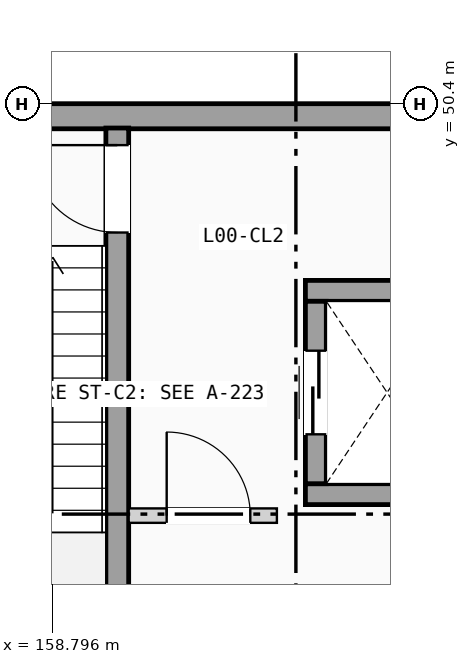
"""IFC4 building model, lengths in metres.
Left out: names, types, materials, properties, quantities, classifications, styles, units other than length and angle.
Written with IfcOpenShell. Run it as: python <this file> out.ifc"""

import sys

from ifc_helpers import new_model, si_unit, direction, frame, frame_2d, origin, place, context, subcontext, project, spatial, rectangle, extrude, element, fill, save


model = new_model("IFC4")
c1 = context("Model", 3, precision=1e-05, world=origin(), true_north=direction((0.0, 1.0)))
c2 = subcontext(c1, "Body", "Model", "MODEL_VIEW")
j1 = project(units=[si_unit("LENGTHUNIT", "METRE"), si_unit("PLANEANGLEUNIT", "RADIAN")], contexts=[c1])
p1 = place(None, origin())
s1 = spatial("IfcSite", under=j1, at=p1, CompositionType="ELEMENT")
p2 = place(p1, origin())
s2 = spatial("IfcBuilding", under=s1, at=p2, CompositionType="ELEMENT")
p3 = place(p2, origin())
s3 = spatial("IfcBuildingStorey", under=s2, at=p3, CompositionType="ELEMENT", Elevation=0.0)
p4 = place(p3, frame((147.6, 50.235, 0.0), z_axis=(0.0, 0.0, 1.0), x_axis=(1.0, 0.0, 0.0)))
e1 = element("IfcWall", 1, at=p4, inside=s3, PredefinedType="SOLIDWALL", context=c2, shape_type="SweptSolid", body=[
    extrude(rectangle(XDim=25.2, YDim=0.33, at=frame_2d((12.6, 0.0))), origin(), (0.0, 0.0, 1.0), 4.64),
])
p5 = place(p4, frame((9.75, 0.0, 0.0)))
e2 = element("IfcOpeningElement", 2, at=p5, cuts=e1, PredefinedType="OPENING", context=c2, shape_type="SweptSolid", body=[
    extrude(rectangle(XDim=1.3, YDim=2.2, at=frame_2d((0.65, 1.1))), frame((0.0, 0.175, 0.0), z_axis=(0.0, -1.0, 0.0), x_axis=(1.0, 0.0, 0.0)), (0.0, 0.0, 1.0), 0.35),
])
p6 = place(p3, frame((159.65, 43.08, 0.0), z_axis=(0.0, 0.0, 1.0), x_axis=(0.0, 1.0, 0.0)))
e3 = element("IfcWall", 3, at=p6, inside=s3, PredefinedType="SHEAR", context=c2, shape_type="SweptSolid", body=[
    extrude(rectangle(XDim=7.0, YDim=0.3, at=frame_2d((3.5, 0.0))), origin(), (0.0, 0.0, 1.0), 4.64),
])
p7 = place(p6, frame((5.625, 0.0, 0.0)))
e4 = element("IfcOpeningElement", 4, at=p7, cuts=e3, PredefinedType="OPENING", context=c2, shape_type="SweptSolid", body=[
    extrude(rectangle(XDim=1.15, YDim=2.12, at=frame_2d((0.575, 1.06))), frame((0.0, 0.16, 0.0), z_axis=(0.0, -1.0, 0.0), x_axis=(1.0, 0.0, 0.0)), (0.0, 0.0, 1.0), 0.32),
])
for number, where, z_axis, x_axis in (
    (5, (162.125, 45.262, 0.0), (0.0, 0.0, 1.0), (1.0, 0.0, 0.0)),
    (6, (162.125, 47.938, 0.0), (0.0, 0.0, 1.0), (1.0, 0.0, 0.0)),
):
    element("IfcWall", number, at=place(p3, frame(where, z_axis=z_axis, x_axis=x_axis)), inside=s3, PredefinedType="SHEAR", context=c2, shape_type="SweptSolid", body=[
        extrude(rectangle(XDim=2.15, YDim=0.275, at=frame_2d((1.075, 0.0))), origin(), (0.0, 0.0, 1.0), 4.64),
    ])
p8 = place(p3, frame((162.262, 45.4, 0.0), z_axis=(0.0, 0.0, 1.0), x_axis=(0.0, 1.0, 0.0)))
e7 = element("IfcWall", 7, at=p8, inside=s3, PredefinedType="SHEAR", context=c2, shape_type="SweptSolid", body=[
    extrude(rectangle(XDim=2.4, YDim=0.275, at=frame_2d((1.2, 0.0))), origin(), (0.0, 0.0, 1.0), 4.64),
])
p9 = place(p8, frame((0.65, 0.0, 0.0)))
e8 = element("IfcOpeningElement", 8, at=p9, cuts=e7, PredefinedType="OPENING", context=c2, shape_type="SweptSolid", body=[
    extrude(rectangle(XDim=1.1, YDim=2.15, at=frame_2d((0.55, 1.075))), frame((0.0, 0.147, 0.0), z_axis=(0.0, -1.0, 0.0), x_axis=(1.0, 0.0, 0.0)), (0.0, 0.0, 1.0), 0.295),
])
p10 = place(p3, frame((159.8, 44.98, 0.0), z_axis=(0.0, 0.0, 1.0), x_axis=(1.0, 0.0, 0.0)))
e9 = element("IfcWall", 9, at=p10, inside=s3, PredefinedType="PARTITIONING", context=c2, shape_type="SweptSolid", body=[
    extrude(rectangle(XDim=1.95, YDim=0.19, at=frame_2d((0.975, 0.0))), origin(), (0.0, 0.0, 1.0), 3.84),
])
p11 = place(p10, frame((0.5, 0.0, 0.0)))
e10 = element("IfcOpeningElement", 10, at=p11, cuts=e9, PredefinedType="OPENING", context=c2, shape_type="SweptSolid", body=[
    extrude(rectangle(XDim=1.1, YDim=2.12, at=frame_2d((0.55, 1.06))), frame((0.0, 0.105, 0.0), z_axis=(0.0, -1.0, 0.0), x_axis=(1.0, 0.0, 0.0)), (0.0, 0.0, 1.0), 0.21),
])
p12 = place(p7, origin())
e11 = element("IfcDoor", 11, at=p12, inside=s3, OperationType="SINGLE_SWING_RIGHT", PredefinedType="DOOR", context=c2, shape_type="SweptSolid", body=[
    extrude(rectangle(XDim=1.15, YDim=2.12, at=frame_2d((0.575, 1.06))), frame((0.0, 0.025, 0.0), z_axis=(0.0, -1.0, 0.0), x_axis=(1.0, 0.0, 0.0)), (0.0, 0.0, 1.0), 0.05),
])
fill(e4, e11)
p13 = place(p9, origin())
e12 = element("IfcDoor", 12, at=p13, inside=s3, OperationType="SLIDING_TO_LEFT", PredefinedType="DOOR", context=c2, shape_type="SweptSolid", body=[
    extrude(rectangle(XDim=1.1, YDim=2.15, at=frame_2d((0.55, 1.075))), frame((0.0, 0.025, 0.0), z_axis=(0.0, -1.0, 0.0), x_axis=(1.0, 0.0, 0.0)), (0.0, 0.0, 1.0), 0.05),
])
fill(e8, e12)
p14 = place(p11, origin())
e13 = element("IfcDoor", 13, at=p14, inside=s3, OperationType="SINGLE_SWING_LEFT", PredefinedType="DOOR", context=c2, shape_type="SweptSolid", body=[
    extrude(rectangle(XDim=1.1, YDim=2.12, at=frame_2d((0.55, 1.06))), frame((0.0, 0.025, 0.0), z_axis=(0.0, -1.0, 0.0), x_axis=(1.0, 0.0, 0.0)), (0.0, 0.0, 1.0), 0.05),
])
fill(e10, e13)
save(model, sys.argv[1])
